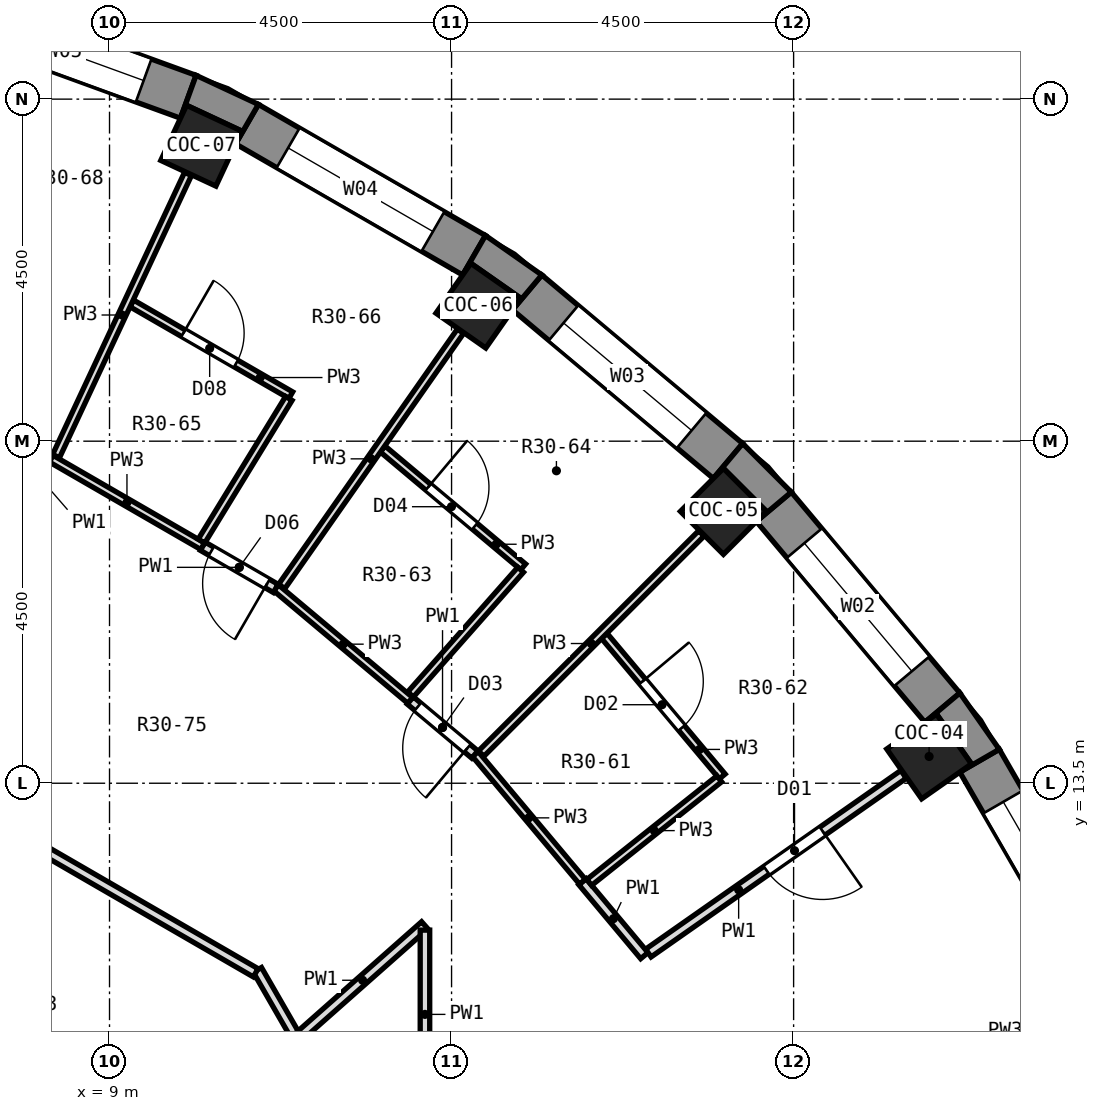
"""IFC4 building model, lengths in metres.
Left out: names, types, materials, properties, quantities, classifications, styles, units other than length and angle.
Written with IfcOpenShell. Run it as: python <this file> out.ifc"""

import sys

from ifc_helpers import new_model, si_unit, direction, frame, frame_2d, origin, origin_2d, place, context, subcontext, project, spatial, polyline, rectangle, outline, extrude, element, fill, save


model = new_model("IFC4")
c1 = context("Model", 3, precision=1e-05, world=origin(), true_north=direction((0.0, 1.0)))
c2 = subcontext(c1, "Body", "Model", "MODEL_VIEW")
j1 = project(units=[si_unit("LENGTHUNIT", "METRE"), si_unit("PLANEANGLEUNIT", "RADIAN")], contexts=[c1])
p1 = place(None, origin())
s1 = spatial("IfcSite", under=j1, at=p1, CompositionType="ELEMENT")
p2 = place(p1, origin())
s2 = spatial("IfcBuilding", under=s1, at=p2, CompositionType="ELEMENT")
p3 = place(p2, frame((0.0, 0.0, 210.3)))
s3 = spatial("IfcBuildingStorey", under=s2, at=p3, CompositionType="ELEMENT", Elevation=210.3)
for number, where, z_axis, x_axis in (
    (1, (19.782, 13.852, 0.0), (0.0, 0.0, 1.0), (0.819, 0.574, 0.0)),
    (2, (17.077, 17.077, 0.0), (0.0, 0.0, 1.0), (0.707, 0.707, 0.0)),
    (3, (13.852, 19.782, 0.0), (0.0, 0.0, 1.0), (0.574, 0.819, 0.0)),
    (4, (10.206, 21.887, 0.0), (0.0, 0.0, 1.0), (0.423, 0.906, 0.0)),
):
    element("IfcColumn", number, at=place(p3, frame(where, z_axis=z_axis, x_axis=x_axis)), inside=s3, PredefinedType="COLUMN", context=c2, shape_type="SweptSolid", body=[
        extrude(rectangle(XDim=0.8, YDim=0.8, at=origin_2d()), origin(), (0.0, 0.0, 1.0), 3.3),
    ])
p4 = place(p3, frame((22.171, 10.809, 0.0), z_axis=(0.0, 0.0, 1.0), x_axis=(-0.499998129301, 0.86602648383, 0.0)))
e5 = element("IfcWall", 5, at=p4, inside=s3, PredefinedType="SOLIDWALL", context=c2, shape_type="SweptSolid", body=[
    extrude(rectangle(XDim=3.45, YDim=0.6, at=frame_2d((1.725, 0.0))), origin(), (0.0, 0.0, 1.0), 2.85),
])
p5 = place(p4, frame((0.625, 0.0, 0.9)))
e6 = element("IfcOpeningElement", 6, at=p5, cuts=e5, PredefinedType="OPENING", context=c2, shape_type="SweptSolid", body=[
    extrude(rectangle(XDim=2.2, YDim=1.8, at=frame_2d((1.1, 0.9))), frame((0.0, 0.312, 0.0), z_axis=(0.0, -1.0, 0.0), x_axis=(1.0, 0.0, 0.0)), (0.0, 0.0, 1.0), 0.624),
])
p6 = place(p3, frame((19.957, 14.494, 0.0), z_axis=(0.0, 0.0, 1.0), x_axis=(-0.642770398358, 0.766058884809, 0.0)))
e7 = element("IfcWall", 7, at=p6, inside=s3, PredefinedType="SOLIDWALL", context=c2, shape_type="SweptSolid", body=[
    extrude(rectangle(XDim=3.449, YDim=0.6, at=frame_2d((1.725, 0.0))), origin(), (0.0, 0.0, 1.0), 2.85),
])
p7 = place(p6, frame((0.625, 0.0, 0.9)))
e8 = element("IfcOpeningElement", 8, at=p7, cuts=e7, PredefinedType="OPENING", context=c2, shape_type="SweptSolid", body=[
    extrude(rectangle(XDim=2.2, YDim=1.8, at=frame_2d((1.1, 0.9))), frame((0.0, 0.312, 0.0), z_axis=(0.0, -1.0, 0.0), x_axis=(1.0, 0.0, 0.0)), (0.0, 0.0, 1.0), 0.624),
])
p8 = place(p3, frame((17.137, 17.74, 0.0), z_axis=(0.0, 0.0, 1.0), x_axis=(-0.766058884809, 0.642770398358, 0.0)))
e9 = element("IfcWall", 9, at=p8, inside=s3, PredefinedType="SOLIDWALL", context=c2, shape_type="SweptSolid", body=[
    extrude(rectangle(XDim=3.449, YDim=0.6, at=frame_2d((1.725, 0.0))), origin(), (0.0, 0.0, 1.0), 2.85),
])
p9 = place(p8, frame((0.625, 0.0, 0.9)))
e10 = element("IfcOpeningElement", 10, at=p9, cuts=e9, PredefinedType="OPENING", context=c2, shape_type="SweptSolid", body=[
    extrude(rectangle(XDim=2.2, YDim=1.8, at=frame_2d((1.1, 0.9))), frame((0.0, 0.312, 0.0), z_axis=(0.0, -1.0, 0.0), x_axis=(1.0, 0.0, 0.0)), (0.0, 0.0, 1.0), 0.624),
])
p10 = place(p3, frame((13.796, 20.446, 0.0), z_axis=(0.0, 0.0, 1.0), x_axis=(-0.86602648383, 0.499998129301, 0.0)))
e11 = element("IfcWall", 11, at=p10, inside=s3, PredefinedType="SOLIDWALL", context=c2, shape_type="SweptSolid", body=[
    extrude(rectangle(XDim=3.45, YDim=0.6, at=frame_2d((1.725, 0.0))), origin(), (0.0, 0.0, 1.0), 2.85),
])
p11 = place(p10, frame((0.625, 0.0, 0.9)))
e12 = element("IfcOpeningElement", 12, at=p11, cuts=e11, PredefinedType="OPENING", context=c2, shape_type="SweptSolid", body=[
    extrude(rectangle(XDim=2.2, YDim=1.8, at=frame_2d((1.1, 0.9))), frame((0.0, 0.312, 0.0), z_axis=(0.0, -1.0, 0.0), x_axis=(1.0, 0.0, 0.0)), (0.0, 0.0, 1.0), 0.624),
])
p12 = place(p3, frame((10.036, 22.531, 0.0), z_axis=(0.0, 0.0, 1.0), x_axis=(-0.93968799822, 0.342032843455, 0.0)))
e13 = element("IfcWall", 13, at=p12, inside=s3, PredefinedType="SOLIDWALL", context=c2, shape_type="SweptSolid", body=[
    extrude(rectangle(XDim=3.45, YDim=0.6, at=frame_2d((1.725, 0.0))), origin(), (0.0, 0.0, 1.0), 2.85),
])
p13 = place(p12, frame((0.625, 0.0, 0.9)))
e14 = element("IfcOpeningElement", 14, at=p13, cuts=e13, PredefinedType="OPENING", context=c2, shape_type="SweptSolid", body=[
    extrude(rectangle(XDim=2.2, YDim=1.8, at=frame_2d((1.1, 0.9))), frame((0.0, 0.312, 0.0), z_axis=(0.0, -1.0, 0.0), x_axis=(1.0, 0.0, 0.0)), (0.0, 0.0, 1.0), 0.624),
])
p14 = place(p3, origin())
e15 = element("IfcWall", 15, at=p14, inside=s3, PredefinedType="SOLIDWALL", context=c2, shape_type="SweptSolid", body=[
    extrude(outline(polyline([(20.706, 13.946), (20.187, 14.687), (19.727, 14.302), (19.881, 14.409), (20.34, 13.754), (20.186, 13.646), (20.706, 13.946)])), origin(), (0.0, 0.0, 1.0), 2.85),
])
p15 = place(p3, origin())
e16 = element("IfcWall", 16, at=p15, inside=s3, PredefinedType="SOLIDWALL", context=c2, shape_type="SweptSolid", body=[
    extrude(outline(polyline([(17.33, 17.969), (16.944, 17.51), (17.077, 17.642), (17.642, 17.077), (17.51, 16.944), (17.969, 17.33), (17.33, 17.969)])), origin(), (0.0, 0.0, 1.0), 2.85),
])
p16 = place(p3, origin())
e17 = element("IfcWall", 17, at=p16, inside=s3, PredefinedType="SOLIDWALL", context=c2, shape_type="SweptSolid", body=[
    extrude(outline(polyline([(14.687, 20.187), (13.946, 20.706), (13.646, 20.186), (13.754, 20.34), (14.409, 19.881), (14.302, 19.727), (14.687, 20.187)])), origin(), (0.0, 0.0, 1.0), 2.85),
])
p17 = place(p3, origin())
e18 = element("IfcWall", 18, at=p17, inside=s3, PredefinedType="SOLIDWALL", context=c2, shape_type="SweptSolid", body=[
    extrude(outline(polyline([(10.139, 22.813), (9.934, 22.249), (10.013, 22.419), (10.738, 22.081), (10.659, 21.911), (10.959, 22.431), (10.139, 22.813)])), origin(), (0.0, 0.0, 1.0), 2.85),
])
p18 = place(p3, frame((10.946, 11.044, 0.0), z_axis=(0.0, 0.0, 1.0), x_axis=(0.49896979131, -0.866619378597, 0.0)))
e19 = element("IfcWall", 19, at=p18, inside=s3, PredefinedType="PARTITIONING", context=c2, shape_type="SweptSolid", body=[
    extrude(rectangle(XDim=1.039, YDim=0.125, at=frame_2d((0.52, 0.0))), origin(), (0.0, 0.0, 1.0), 2.85),
])
p19 = place(p3, frame((15.222, 12.204, 0.0), z_axis=(0.0, 0.0, 1.0), x_axis=(0.641754990355, -0.766909728948, 0.0)))
e20 = element("IfcWall", 20, at=p19, inside=s3, PredefinedType="PARTITIONING", context=c2, shape_type="SweptSolid", body=[
    extrude(rectangle(XDim=1.268, YDim=0.125, at=frame_2d((0.634, 0.0))), origin(), (0.0, 0.0, 1.0), 2.85),
])
p20 = place(p3, frame((13.812, 13.885, 0.0), z_axis=(0.0, 0.0, 1.0), x_axis=(0.642719704672, -0.766101417063, 0.0)))
e21 = element("IfcWall", 21, at=p20, inside=s3, PredefinedType="PARTITIONING", context=c2, shape_type="SweptSolid", body=[
    extrude(rectangle(XDim=2.194, YDim=0.1, at=frame_2d((1.097, 0.0))), origin(), (0.0, 0.0, 1.0), 2.85),
])
p21 = place(p3, frame((15.509, 15.439, 0.0), z_axis=(0.0, 0.0, 1.0), x_axis=(0.642786493814, -0.766045379446, 0.0)))
e22 = element("IfcWall", 22, at=p21, inside=s3, PredefinedType="PARTITIONING", context=c2, shape_type="SweptSolid", body=[
    extrude(rectangle(XDim=2.415, YDim=0.1, at=frame_2d((1.207, 0.0))), origin(), (0.0, 0.0, 1.0), 2.85),
])
p22 = place(p21, frame((0.782, 0.0, 0.0)))
e23 = element("IfcOpeningElement", 23, at=p22, cuts=e22, PredefinedType="OPENING", context=c2, shape_type="SweptSolid", body=[
    extrude(rectangle(XDim=0.8, YDim=2.1, at=frame_2d((0.4, 1.05))), frame((0.0, 0.062, 0.0), z_axis=(0.0, -1.0, 0.0), x_axis=(1.0, 0.0, 0.0)), (0.0, 0.0, 1.0), 0.124),
])
p23 = place(p3, frame((11.191, 16.071, 0.0), z_axis=(0.0, 0.0, 1.0), x_axis=(0.766099024104, -0.642722556993, 0.0)))
e24 = element("IfcWall", 24, at=p23, inside=s3, PredefinedType="PARTITIONING", context=c2, shape_type="SweptSolid", body=[
    extrude(rectangle(XDim=2.305, YDim=0.1, at=frame_2d((1.153, 0.0))), origin(), (0.0, 0.0, 1.0), 2.85),
])
p24 = place(p3, frame((12.957, 14.589, 0.0), z_axis=(0.0, 0.0, 1.0), x_axis=(0.766464721633, -0.642286408459, 0.0)))
e25 = element("IfcWall", 25, at=p24, inside=s3, PredefinedType="PARTITIONING", context=c2, shape_type="SweptSolid", body=[
    extrude(rectangle(XDim=1.107, YDim=0.125, at=frame_2d((0.553, 0.0))), origin(), (0.0, 0.0, 1.0), 2.85),
])
p25 = place(p24, frame((0.128, 0.0, 0.0)))
e26 = element("IfcOpeningElement", 26, at=p25, cuts=e25, PredefinedType="OPENING", context=c2, shape_type="SweptSolid", body=[
    extrude(rectangle(XDim=0.85, YDim=2.1, at=frame_2d((0.425, 1.05))), frame((0.0, 0.074, 0.0), z_axis=(0.0, -1.0, 0.0), x_axis=(1.0, 0.0, 0.0)), (0.0, 0.0, 1.0), 0.149),
])
p26 = place(p3, frame((12.593, 17.898, 0.0), z_axis=(0.0, 0.0, 1.0), x_axis=(0.765878189611, -0.642985690882, 0.0)))
e27 = element("IfcWall", 27, at=p26, inside=s3, PredefinedType="PARTITIONING", context=c2, shape_type="SweptSolid", body=[
    extrude(rectangle(XDim=2.414, YDim=0.1, at=frame_2d((1.207, 0.0))), origin(), (0.0, 0.0, 1.0), 2.85),
])
p27 = place(p26, frame((0.782, 0.0, 0.0)))
e28 = element("IfcOpeningElement", 28, at=p27, cuts=e27, PredefinedType="OPENING", context=c2, shape_type="SweptSolid", body=[
    extrude(rectangle(XDim=0.8, YDim=2.1, at=frame_2d((0.4, 1.05))), frame((0.0, 0.062, 0.0), z_axis=(0.0, -1.0, 0.0), x_axis=(1.0, 0.0, 0.0)), (0.0, 0.0, 1.0), 0.124),
])
p28 = place(p3, frame((3.957, 15.037, 0.0), z_axis=(0.0, 0.0, 1.0), x_axis=(0.865555702761, -0.500812664994, 0.0)))
e29 = element("IfcWall", 29, at=p28, inside=s3, PredefinedType="PARTITIONING", context=c2, shape_type="SweptSolid", body=[
    extrude(rectangle(XDim=8.049, YDim=0.125, at=frame_2d((4.024, 0.0))), origin(), (0.0, 0.0, 1.0), 2.85),
])
p29 = place(p3, frame((3.26, 12.436, 0.0), z_axis=(0.0, 0.0, 1.0), x_axis=(0.865965002636, -0.500104603268, 0.0)))
e30 = element("IfcWall", 30, at=p29, inside=s3, PredefinedType="PARTITIONING", context=c2, shape_type="SweptSolid", body=[
    extrude(rectangle(XDim=6.654, YDim=0.125, at=frame_2d((3.327, 0.0))), origin(), (0.0, 0.0, 1.0), 2.85),
])
p30 = place(p29, frame((2.844, 0.0, 0.0)))
e31 = element("IfcOpeningElement", 31, at=p30, cuts=e30, PredefinedType="OPENING", context=c2, shape_type="SweptSolid", body=[
    extrude(rectangle(XDim=1.0, YDim=2.1, at=frame_2d((0.5, 1.05))), frame((0.0, 0.074, 0.0), z_axis=(0.0, -1.0, 0.0), x_axis=(1.0, 0.0, 0.0)), (0.0, 0.0, 1.0), 0.149),
])
p31 = place(p3, frame((8.231, 17.771, 0.0), z_axis=(0.0, 0.0, 1.0), x_axis=(0.865906868937, -0.5002052522, 0.0)))
e32 = element("IfcWall", 32, at=p31, inside=s3, PredefinedType="PARTITIONING", context=c2, shape_type="SweptSolid", body=[
    extrude(rectangle(XDim=2.305, YDim=0.1, at=frame_2d((1.153, 0.0))), origin(), (0.0, 0.0, 1.0), 2.85),
])
p32 = place(p3, frame((10.227, 16.617, 0.0), z_axis=(0.0, 0.0, 1.0), x_axis=(0.865888396158, -0.500237229121, 0.0)))
e33 = element("IfcWall", 33, at=p32, inside=s3, PredefinedType="PARTITIONING", context=c2, shape_type="SweptSolid", body=[
    extrude(rectangle(XDim=1.108, YDim=0.125, at=frame_2d((0.554, 0.0))), origin(), (0.0, 0.0, 1.0), 2.85),
])
p33 = place(p32, frame((0.129, 0.0, 0.0)))
e34 = element("IfcOpeningElement", 34, at=p33, cuts=e33, PredefinedType="OPENING", context=c2, shape_type="SweptSolid", body=[
    extrude(rectangle(XDim=0.85, YDim=2.1, at=frame_2d((0.425, 1.05))), frame((0.0, 0.074, 0.0), z_axis=(0.0, -1.0, 0.0), x_axis=(1.0, 0.0, 0.0)), (0.0, 0.0, 1.0), 0.149),
])
p34 = place(p3, frame((9.293, 19.812, 0.0), z_axis=(0.0, 0.0, 1.0), x_axis=(0.866145191815, -0.499792463624, 0.0)))
e35 = element("IfcWall", 35, at=p34, inside=s3, PredefinedType="PARTITIONING", context=c2, shape_type="SweptSolid", body=[
    extrude(rectangle(XDim=2.415, YDim=0.1, at=frame_2d((1.208, 0.0))), origin(), (0.0, 0.0, 1.0), 2.85),
])
p35 = place(p34, frame((0.782, 0.0, 0.0)))
e36 = element("IfcOpeningElement", 36, at=p35, cuts=e35, PredefinedType="OPENING", context=c2, shape_type="SweptSolid", body=[
    extrude(rectangle(XDim=0.8, YDim=2.1, at=frame_2d((0.4, 1.05))), frame((0.0, 0.062, 0.0), z_axis=(0.0, -1.0, 0.0), x_axis=(1.0, 0.0, 0.0)), (0.0, 0.0, 1.0), 0.124),
])
p36 = place(p3, frame((16.089, 11.266, 0.0), z_axis=(0.0, 0.0, 1.0), x_axis=(0.819131167898, 0.573606249772, 0.0)))
e37 = element("IfcWall", 37, at=p36, inside=s3, PredefinedType="PARTITIONING", context=c2, shape_type="SweptSolid", body=[
    extrude(rectangle(XDim=4.099, YDim=0.125, at=frame_2d((2.049, 0.0))), origin(), (0.0, 0.0, 1.0), 2.85),
])
p37 = place(p36, frame((1.897, 0.0, 0.0)))
e38 = element("IfcOpeningElement", 38, at=p37, cuts=e37, PredefinedType="OPENING", context=c2, shape_type="SweptSolid", body=[
    extrude(rectangle(XDim=0.9, YDim=2.1, at=frame_2d((0.45, 1.05))), frame((0.0, 0.074, 0.0), z_axis=(0.0, -1.0, 0.0), x_axis=(1.0, 0.0, 0.0)), (0.0, 0.0, 1.0), 0.149),
])
p38 = place(p3, frame((15.311, 12.195, 0.0), z_axis=(0.0, 0.0, 1.0), x_axis=(0.782195530376, 0.623033026621, 0.0)))
e39 = element("IfcWall", 39, at=p38, inside=s3, PredefinedType="PARTITIONING", context=c2, shape_type="SweptSolid", body=[
    extrude(rectangle(XDim=2.187, YDim=0.1, at=frame_2d((1.094, 0.0))), origin(), (0.0, 0.0, 1.0), 2.85),
])
p39 = place(p3, frame((11.512, 10.184, 0.0), z_axis=(0.0, 0.0, 1.0), x_axis=(0.748998696572, 0.662571469755, 0.0)))
e40 = element("IfcWall", 40, at=p39, inside=s3, PredefinedType="PARTITIONING", context=c2, shape_type="SweptSolid", body=[
    extrude(rectangle(XDim=2.184, YDim=0.125, at=frame_2d((1.092, 0.0))), origin(), (0.0, 0.0, 1.0), 2.85),
])
p40 = place(p3, frame((13.889, 13.889, 0.0), z_axis=(0.0, 0.0, 1.0), x_axis=(0.707106781187, 0.707106781187, 0.0)))
e41 = element("IfcWall", 41, at=p40, inside=s3, PredefinedType="PARTITIONING", context=c2, shape_type="SweptSolid", body=[
    extrude(rectangle(XDim=4.098, YDim=0.1, at=frame_2d((2.049, 0.0))), origin(), (0.0, 0.0, 1.0), 2.85),
])
p41 = place(p3, frame((12.96, 14.668, 0.0), z_axis=(0.0, 0.0, 1.0), x_axis=(0.661846667472, 0.749639239072, 0.0)))
e42 = element("IfcWall", 42, at=p41, inside=s3, PredefinedType="PARTITIONING", context=c2, shape_type="SweptSolid", body=[
    extrude(rectangle(XDim=2.188, YDim=0.1, at=frame_2d((1.094, 0.0))), origin(), (0.0, 0.0, 1.0), 2.85),
])
p42 = place(p3, frame((11.266, 16.089, 0.0), z_axis=(0.0, 0.0, 1.0), x_axis=(0.573606249772, 0.819131167898, 0.0)))
e43 = element("IfcWall", 43, at=p42, inside=s3, PredefinedType="PARTITIONING", context=c2, shape_type="SweptSolid", body=[
    extrude(rectangle(XDim=4.099, YDim=0.1, at=frame_2d((2.049, 0.0))), origin(), (0.0, 0.0, 1.0), 2.85),
])
p43 = place(p3, frame((10.21, 16.686, 0.0), z_axis=(0.0, 0.0, 1.0), x_axis=(0.522046798857, 0.852916842256, 0.0)))
e44 = element("IfcWall", 44, at=p43, inside=s3, PredefinedType="PARTITIONING", context=c2, shape_type="SweptSolid", body=[
    extrude(rectangle(XDim=2.2, YDim=0.1, at=frame_2d((1.1, 0.0))), origin(), (0.0, 0.0, 1.0), 2.85),
])
p44 = place(p3, frame((8.297, 17.804, 0.0), z_axis=(0.0, 0.0, 1.0), x_axis=(0.423514808753, 0.90588918018, 0.0)))
e45 = element("IfcWall", 45, at=p44, inside=s3, PredefinedType="PARTITIONING", context=c2, shape_type="SweptSolid", body=[
    extrude(rectangle(XDim=4.098, YDim=0.1, at=frame_2d((2.049, 0.0))), origin(), (0.0, 0.0, 1.0), 2.85),
])
p45 = place(p3, frame((13.15, 9.351, 0.0), z_axis=(0.0, 0.0, 1.0), x_axis=(0.0, 1.0, 0.0)))
e46 = element("IfcWall", 46, at=p45, inside=s3, PredefinedType="PARTITIONING", context=c2, shape_type="SweptSolid", body=[
    extrude(rectangle(XDim=2.216, YDim=0.125, at=frame_2d((1.108, 0.0))), origin(), (0.0, 0.0, 1.0), 2.85),
])
p46 = place(p5, origin())
e47 = element("IfcWindow", 47, at=p46, inside=s3, PartitioningType="SINGLE_PANEL", PredefinedType="WINDOW", context=c2, shape_type="SweptSolid", body=[
    extrude(rectangle(XDim=2.2, YDim=1.8, at=frame_2d((1.1, 0.9))), frame((0.0, 0.18, 0.0), z_axis=(0.0, -1.0, 0.0), x_axis=(1.0, 0.0, 0.0)), (0.0, 0.0, 1.0), 0.06),
])
fill(e6, e47)
p47 = place(p7, origin())
e48 = element("IfcWindow", 48, at=p47, inside=s3, PartitioningType="SINGLE_PANEL", PredefinedType="WINDOW", context=c2, shape_type="SweptSolid", body=[
    extrude(rectangle(XDim=2.2, YDim=1.8, at=frame_2d((1.1, 0.9))), frame((0.0, 0.18, 0.0), z_axis=(0.0, -1.0, 0.0), x_axis=(1.0, 0.0, 0.0)), (0.0, 0.0, 1.0), 0.06),
])
fill(e8, e48)
p48 = place(p9, origin())
e49 = element("IfcWindow", 49, at=p48, inside=s3, PartitioningType="SINGLE_PANEL", PredefinedType="WINDOW", context=c2, shape_type="SweptSolid", body=[
    extrude(rectangle(XDim=2.2, YDim=1.8, at=frame_2d((1.1, 0.9))), frame((0.0, 0.18, 0.0), z_axis=(0.0, -1.0, 0.0), x_axis=(1.0, 0.0, 0.0)), (0.0, 0.0, 1.0), 0.06),
])
fill(e10, e49)
p49 = place(p11, origin())
e50 = element("IfcWindow", 50, at=p49, inside=s3, PartitioningType="SINGLE_PANEL", PredefinedType="WINDOW", context=c2, shape_type="SweptSolid", body=[
    extrude(rectangle(XDim=2.2, YDim=1.8, at=frame_2d((1.1, 0.9))), frame((0.0, 0.18, 0.0), z_axis=(0.0, -1.0, 0.0), x_axis=(1.0, 0.0, 0.0)), (0.0, 0.0, 1.0), 0.06),
])
fill(e12, e50)
p50 = place(p13, origin())
e51 = element("IfcWindow", 51, at=p50, inside=s3, PartitioningType="SINGLE_PANEL", PredefinedType="WINDOW", context=c2, shape_type="SweptSolid", body=[
    extrude(rectangle(XDim=2.2, YDim=1.8, at=frame_2d((1.1, 0.9))), frame((0.0, 0.18, 0.0), z_axis=(0.0, -1.0, 0.0), x_axis=(1.0, 0.0, 0.0)), (0.0, 0.0, 1.0), 0.06),
])
fill(e14, e51)
p51 = place(p37, frame((0.9, 0.0, 0.0), z_axis=(0.0, 0.0, 1.0), x_axis=(-1.0, 0.0, 0.0)))
e52 = element("IfcDoor", 52, at=p51, inside=s3, OperationType="SINGLE_SWING_LEFT", PredefinedType="DOOR", context=c2, shape_type="SweptSolid", body=[
    extrude(rectangle(XDim=0.9, YDim=2.1, at=frame_2d((0.45, 1.05))), frame((0.0, 0.025, 0.0), z_axis=(0.0, -1.0, 0.0), x_axis=(1.0, 0.0, 0.0)), (0.0, 0.0, 1.0), 0.05),
])
fill(e38, e52)
p52 = place(p22, origin())
e53 = element("IfcDoor", 53, at=p52, inside=s3, OperationType="SINGLE_SWING_LEFT", PredefinedType="DOOR", context=c2, shape_type="SweptSolid", body=[
    extrude(rectangle(XDim=0.8, YDim=2.1, at=frame_2d((0.4, 1.05))), frame((0.0, 0.025, 0.0), z_axis=(0.0, -1.0, 0.0), x_axis=(1.0, 0.0, 0.0)), (0.0, 0.0, 1.0), 0.05),
])
fill(e23, e53)
p53 = place(p25, frame((0.85, 0.0, 0.0), z_axis=(0.0, 0.0, 1.0), x_axis=(-1.0, 0.0, 0.0)))
e54 = element("IfcDoor", 54, at=p53, inside=s3, OperationType="SINGLE_SWING_LEFT", PredefinedType="DOOR", context=c2, shape_type="SweptSolid", body=[
    extrude(rectangle(XDim=0.85, YDim=2.1, at=frame_2d((0.425, 1.05))), frame((0.0, 0.025, 0.0), z_axis=(0.0, -1.0, 0.0), x_axis=(1.0, 0.0, 0.0)), (0.0, 0.0, 1.0), 0.05),
])
fill(e26, e54)
p54 = place(p27, origin())
e55 = element("IfcDoor", 55, at=p54, inside=s3, OperationType="SINGLE_SWING_LEFT", PredefinedType="DOOR", context=c2, shape_type="SweptSolid", body=[
    extrude(rectangle(XDim=0.8, YDim=2.1, at=frame_2d((0.4, 1.05))), frame((0.0, 0.025, 0.0), z_axis=(0.0, -1.0, 0.0), x_axis=(1.0, 0.0, 0.0)), (0.0, 0.0, 1.0), 0.05),
])
fill(e28, e55)
p55 = place(p33, frame((0.85, 0.0, 0.0), z_axis=(0.0, 0.0, 1.0), x_axis=(-1.0, 0.0, 0.0)))
e56 = element("IfcDoor", 56, at=p55, inside=s3, OperationType="SINGLE_SWING_LEFT", PredefinedType="DOOR", context=c2, shape_type="SweptSolid", body=[
    extrude(rectangle(XDim=0.85, YDim=2.1, at=frame_2d((0.425, 1.05))), frame((0.0, 0.025, 0.0), z_axis=(0.0, -1.0, 0.0), x_axis=(1.0, 0.0, 0.0)), (0.0, 0.0, 1.0), 0.05),
])
fill(e34, e56)
p56 = place(p35, origin())
e57 = element("IfcDoor", 57, at=p56, inside=s3, OperationType="SINGLE_SWING_LEFT", PredefinedType="DOOR", context=c2, shape_type="SweptSolid", body=[
    extrude(rectangle(XDim=0.8, YDim=2.1, at=frame_2d((0.4, 1.05))), frame((0.0, 0.025, 0.0), z_axis=(0.0, -1.0, 0.0), x_axis=(1.0, 0.0, 0.0)), (0.0, 0.0, 1.0), 0.05),
])
fill(e36, e57)
save(model, sys.argv[1])
